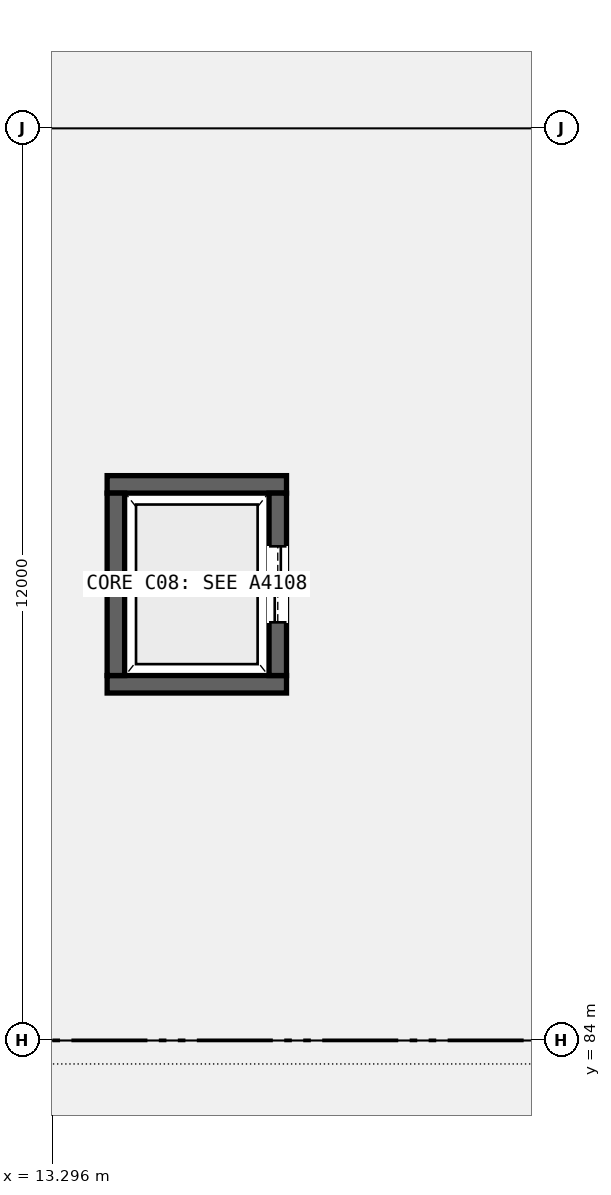
"""IFC4 building model, lengths in metres.
Left out: names, types, materials, properties, quantities, classifications, styles, units other than length and angle.
Written with IfcOpenShell. Run it as: python <this file> out.ifc"""

import sys

from ifc_helpers import new_model, si_unit, direction, frame, frame_2d, origin, place, context, subcontext, project, spatial, rectangle, extrude, element, fill, save


model = new_model("IFC4")
c1 = context("Model", 3, precision=1e-05, world=origin(), true_north=direction((0.0, 1.0)))
c2 = subcontext(c1, "Body", "Model", "MODEL_VIEW")
j1 = project(units=[si_unit("LENGTHUNIT", "METRE"), si_unit("PLANEANGLEUNIT", "RADIAN")], contexts=[c1])
p1 = place(None, origin())
s1 = spatial("IfcSite", under=j1, at=p1, CompositionType="ELEMENT")
p2 = place(p1, origin())
s2 = spatial("IfcBuilding", under=s1, at=p2, CompositionType="ELEMENT")
p3 = place(p2, frame((0.0, 0.0, -4.8)))
s3 = spatial("IfcBuildingStorey", under=s2, at=p3, CompositionType="ELEMENT", Elevation=-4.8)
for number, where, z_axis, x_axis in (
    (1, (14.02, 88.685, -0.65), (0.0, 0.0, 1.0), (1.0, 0.0, 0.0)),
    (2, (14.02, 91.315, -0.65), (0.0, 0.0, 1.0), (1.0, 0.0, 0.0)),
):
    element("IfcWall", number, at=place(p3, frame(where, z_axis=z_axis, x_axis=x_axis)), inside=s3, PredefinedType="SHEAR", context=c2, shape_type="SweptSolid", body=[
        extrude(rectangle(XDim=2.36, YDim=0.23, at=frame_2d((1.18, 0.0))), origin(), (0.0, 0.0, 1.0), 4.5),
    ])
p4 = place(p3, frame((14.135, 88.8, -0.65), z_axis=(0.0, 0.0, 1.0), x_axis=(0.0, 1.0, 0.0)))
e3 = element("IfcWall", 3, at=p4, inside=s3, PredefinedType="SHEAR", context=c2, shape_type="SweptSolid", body=[
    extrude(rectangle(XDim=2.4, YDim=0.23, at=frame_2d((1.2, 0.0))), origin(), (0.0, 0.0, 1.0), 4.5),
])
p5 = place(p3, frame((16.265, 88.8, -0.65), z_axis=(0.0, 0.0, 1.0), x_axis=(0.0, 1.0, 0.0)))
e4 = element("IfcWall", 4, at=p5, inside=s3, PredefinedType="SHEAR", context=c2, shape_type="SweptSolid", body=[
    extrude(rectangle(XDim=2.4, YDim=0.23, at=frame_2d((1.2, 0.0))), origin(), (0.0, 0.0, 1.0), 4.5),
])
p6 = place(p5, frame((0.7, 0.0, 0.65)))
e5 = element("IfcOpeningElement", 5, at=p6, cuts=e4, PredefinedType="OPENING", context=c2, shape_type="SweptSolid", body=[
    extrude(rectangle(XDim=1.0, YDim=2.15, at=frame_2d((0.5, 1.075))), frame((0.0, 0.125, 0.0), z_axis=(0.0, -1.0, 0.0), x_axis=(1.0, 0.0, 0.0)), (0.0, 0.0, 1.0), 0.25),
])
p7 = place(p6, origin())
e6 = element("IfcDoor", 6, at=p7, inside=s3, OperationType="DOUBLE_DOOR_SLIDING", PredefinedType="DOOR", context=c2, shape_type="SweptSolid", body=[
    extrude(rectangle(XDim=1.0, YDim=2.15, at=frame_2d((0.5, 1.075))), frame((0.0, 0.025, 0.0), z_axis=(0.0, -1.0, 0.0), x_axis=(1.0, 0.0, 0.0)), (0.0, 0.0, 1.0), 0.05),
])
fill(e5, e6)
save(model, sys.argv[1])
